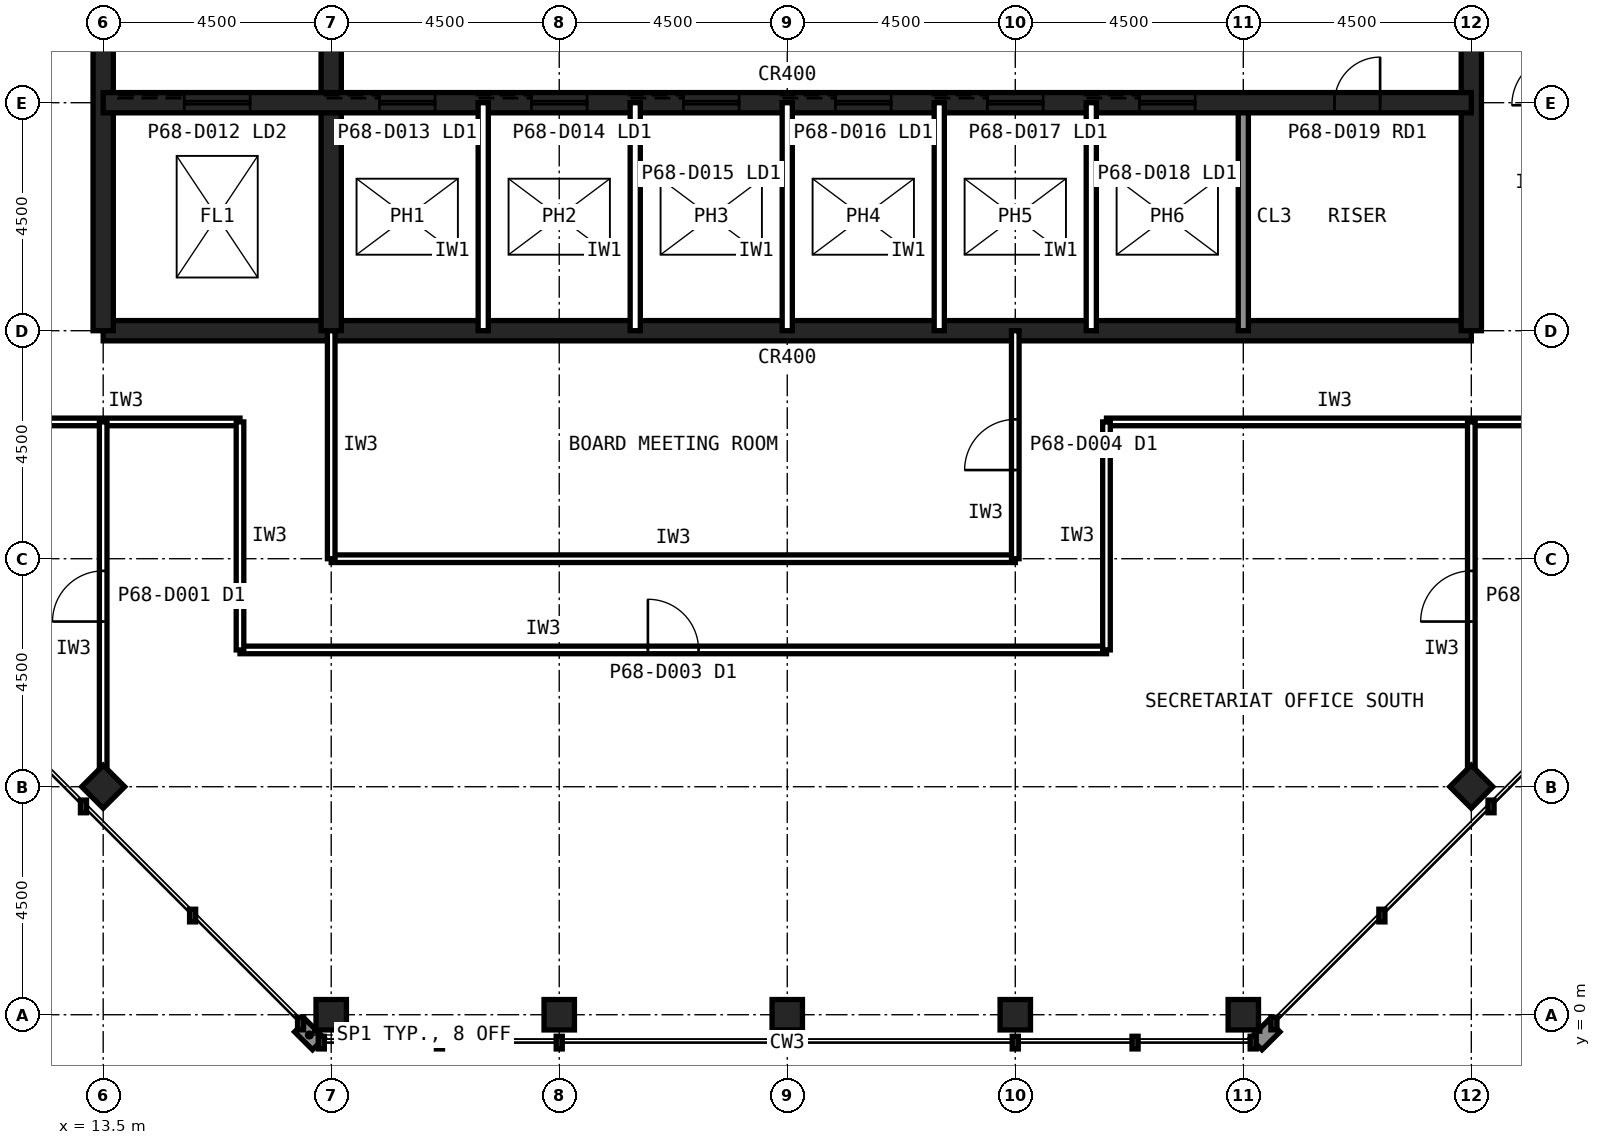
"""IFC4 building model, lengths in metres.
Left out: names, types, materials, properties, quantities, classifications, styles, units other than length and angle.
Written with IfcOpenShell. Run it as: python <this file> out.ifc"""

import sys

from ifc_helpers import new_model, si_unit, direction, frame, frame_2d, origin, origin_2d, place, context, subcontext, project, spatial, rectangle, hollow_rectangle, extrude, element, fill, save


model = new_model("IFC4")
c1 = context("Model", 3, precision=1e-05, world=origin(), true_north=direction((0.0, 1.0)))
c2 = subcontext(c1, "Body", "Model", "MODEL_VIEW")
j1 = project(units=[si_unit("LENGTHUNIT", "METRE"), si_unit("PLANEANGLEUNIT", "RADIAN")], contexts=[c1])
p1 = place(None, origin())
s1 = spatial("IfcSite", under=j1, at=p1, CompositionType="ELEMENT")
p2 = place(p1, origin())
s2 = spatial("IfcBuilding", under=s1, at=p2, CompositionType="ELEMENT")
p3 = place(p2, frame((0.0, 0.0, 286.6)))
s3 = spatial("IfcBuildingStorey", under=s2, at=p3, CompositionType="ELEMENT", Elevation=286.6)
for number, where, z_axis, x_axis in (
    (1, (18.0, 0.0, 0.0), (0.0, 0.0, 1.0), (1.0, 0.0, 0.0)),
    (2, (22.5, 0.0, 0.0), (0.0, 0.0, 1.0), (1.0, 0.0, 0.0)),
    (3, (27.0, 0.0, 0.0), (0.0, 0.0, 1.0), (1.0, 0.0, 0.0)),
    (4, (31.5, 0.0, 0.0), (0.0, 0.0, 1.0), (1.0, 0.0, 0.0)),
    (5, (36.0, 0.0, 0.0), (0.0, 0.0, 1.0), (1.0, 0.0, 0.0)),
    (6, (13.5, 4.5, 0.0), (0.0, 0.0, 1.0), (0.707, 0.707, 0.0)),
    (7, (40.5, 4.5, 0.0), (0.0, 0.0, 1.0), (0.707, 0.707, 0.0)),
):
    element("IfcColumn", number, at=place(p3, frame(where, z_axis=z_axis, x_axis=x_axis)), inside=s3, PredefinedType="COLUMN", context=c2, shape_type="SweptSolid", body=[
        extrude(hollow_rectangle(XDim=0.6, YDim=0.6, WallThickness=0.028, at=origin_2d()), origin(), (0.0, 0.0, 1.0), 4.0),
    ])
p4 = place(p3, frame((13.5, 13.5, 0.0), z_axis=(0.0, 0.0, 1.0), x_axis=(1.0, 0.0, 0.0)))
e8 = element("IfcWall", 8, at=p4, inside=s3, PredefinedType="SHEAR", context=c2, shape_type="SweptSolid", body=[
    extrude(rectangle(XDim=27.0, YDim=0.4, at=frame_2d((13.5, 0.0))), origin(), (0.0, 0.0, 1.0), 4.0),
])
p5 = place(p3, frame((40.5, 13.5, 0.0), z_axis=(0.0, 0.0, 1.0), x_axis=(0.0, 1.0, 0.0)))
e9 = element("IfcWall", 9, at=p5, inside=s3, PredefinedType="SHEAR", context=c2, shape_type="SweptSolid", body=[
    extrude(rectangle(XDim=27.0, YDim=0.4, at=frame_2d((13.5, 0.0))), origin(), (0.0, 0.0, 1.0), 4.0),
])
p6 = place(p5, frame((5.85, 0.0, 0.0)))
e10 = element("IfcOpeningElement", 10, at=p6, cuts=e9, PredefinedType="OPENING", context=c2, shape_type="SweptSolid", body=[
    extrude(rectangle(XDim=1.8, YDim=2.1, at=frame_2d((0.9, 1.05))), frame((0.0, 0.21, 0.0), z_axis=(0.0, -1.0, 0.0), x_axis=(1.0, 0.0, 0.0)), (0.0, 0.0, 1.0), 0.42),
])
p7 = place(p5, frame((19.65, 0.0, 0.0)))
e11 = element("IfcOpeningElement", 11, at=p7, cuts=e9, PredefinedType="OPENING", context=c2, shape_type="SweptSolid", body=[
    extrude(rectangle(XDim=1.2, YDim=2.1, at=frame_2d((0.6, 1.05))), frame((0.0, 0.21, 0.0), z_axis=(0.0, -1.0, 0.0), x_axis=(1.0, 0.0, 0.0)), (0.0, 0.0, 1.0), 0.42),
])
p8 = place(p3, frame((13.5, 40.5, 0.0), z_axis=(0.0, 0.0, 1.0), x_axis=(0.0, -1.0, 0.0)))
e12 = element("IfcWall", 12, at=p8, inside=s3, PredefinedType="SHEAR", context=c2, shape_type="SweptSolid", body=[
    extrude(rectangle(XDim=27.0, YDim=0.4, at=frame_2d((13.5, 0.0))), origin(), (0.0, 0.0, 1.0), 4.0),
])
p9 = place(p8, frame((19.65, 0.0, 0.0)))
e13 = element("IfcOpeningElement", 13, at=p9, cuts=e12, PredefinedType="OPENING", context=c2, shape_type="SweptSolid", body=[
    extrude(rectangle(XDim=1.2, YDim=2.1, at=frame_2d((0.6, 1.05))), frame((0.0, 0.21, 0.0), z_axis=(0.0, -1.0, 0.0), x_axis=(1.0, 0.0, 0.0)), (0.0, 0.0, 1.0), 0.42),
])
p10 = place(p8, frame((5.85, 0.0, 0.0)))
e14 = element("IfcOpeningElement", 14, at=p10, cuts=e12, PredefinedType="OPENING", context=c2, shape_type="SweptSolid", body=[
    extrude(rectangle(XDim=1.8, YDim=2.1, at=frame_2d((0.9, 1.05))), frame((0.0, 0.21, 0.0), z_axis=(0.0, -1.0, 0.0), x_axis=(1.0, 0.0, 0.0)), (0.0, 0.0, 1.0), 0.42),
])
p11 = place(p3, frame((18.0, 13.5, 0.0), z_axis=(0.0, 0.0, 1.0), x_axis=(0.0, 1.0, 0.0)))
e15 = element("IfcWall", 15, at=p11, inside=s3, PredefinedType="SHEAR", context=c2, shape_type="SweptSolid", body=[
    extrude(rectangle(XDim=18.0, YDim=0.4, at=frame_2d((9.0, 0.0))), origin(), (0.0, 0.0, 1.0), 4.0),
])
p12 = place(p3, frame((36.0, 13.5, 0.0), z_axis=(0.0, 0.0, 1.0), x_axis=(0.0, 1.0, 0.0)))
e16 = element("IfcWall", 16, at=p12, inside=s3, PredefinedType="SOLIDWALL", context=c2, shape_type="SweptSolid", body=[
    extrude(rectangle(XDim=4.5, YDim=0.2, at=frame_2d((2.25, 0.0))), origin(), (0.0, 0.0, 1.0), 3.84),
])
p13 = place(p3, frame((13.5, 18.0, 0.0), z_axis=(0.0, 0.0, 1.0), x_axis=(1.0, 0.0, 0.0)))
e17 = element("IfcWall", 17, at=p13, inside=s3, PredefinedType="SHEAR", context=c2, shape_type="SweptSolid", body=[
    extrude(rectangle(XDim=27.0, YDim=0.4, at=frame_2d((13.5, 0.0))), origin(), (0.0, 0.0, 1.0), 4.0),
])
p14 = place(p13, frame((24.3, 0.0, 0.0)))
e18 = element("IfcOpeningElement", 18, at=p14, cuts=e17, PredefinedType="OPENING", context=c2, shape_type="SweptSolid", body=[
    extrude(rectangle(XDim=0.9, YDim=2.1, at=frame_2d((0.45, 1.05))), frame((0.0, 0.21, 0.0), z_axis=(0.0, -1.0, 0.0), x_axis=(1.0, 0.0, 0.0)), (0.0, 0.0, 1.0), 0.42),
])
p15 = place(p13, frame((5.45, 0.0, 0.0)))
e19 = element("IfcOpeningElement", 19, at=p15, cuts=e17, PredefinedType="OPENING", context=c2, shape_type="SweptSolid", body=[
    extrude(rectangle(XDim=1.1, YDim=2.1, at=frame_2d((0.55, 1.05))), frame((0.0, 0.21, 0.0), z_axis=(0.0, -1.0, 0.0), x_axis=(1.0, 0.0, 0.0)), (0.0, 0.0, 1.0), 0.42),
])
p16 = place(p13, frame((8.45, 0.0, 0.0)))
e20 = element("IfcOpeningElement", 20, at=p16, cuts=e17, PredefinedType="OPENING", context=c2, shape_type="SweptSolid", body=[
    extrude(rectangle(XDim=1.1, YDim=2.1, at=frame_2d((0.55, 1.05))), frame((0.0, 0.21, 0.0), z_axis=(0.0, -1.0, 0.0), x_axis=(1.0, 0.0, 0.0)), (0.0, 0.0, 1.0), 0.42),
])
p17 = place(p13, frame((11.45, 0.0, 0.0)))
e21 = element("IfcOpeningElement", 21, at=p17, cuts=e17, PredefinedType="OPENING", context=c2, shape_type="SweptSolid", body=[
    extrude(rectangle(XDim=1.1, YDim=2.1, at=frame_2d((0.55, 1.05))), frame((0.0, 0.21, 0.0), z_axis=(0.0, -1.0, 0.0), x_axis=(1.0, 0.0, 0.0)), (0.0, 0.0, 1.0), 0.42),
])
p18 = place(p13, frame((14.45, 0.0, 0.0)))
e22 = element("IfcOpeningElement", 22, at=p18, cuts=e17, PredefinedType="OPENING", context=c2, shape_type="SweptSolid", body=[
    extrude(rectangle(XDim=1.1, YDim=2.1, at=frame_2d((0.55, 1.05))), frame((0.0, 0.21, 0.0), z_axis=(0.0, -1.0, 0.0), x_axis=(1.0, 0.0, 0.0)), (0.0, 0.0, 1.0), 0.42),
])
p19 = place(p13, frame((17.45, 0.0, 0.0)))
e23 = element("IfcOpeningElement", 23, at=p19, cuts=e17, PredefinedType="OPENING", context=c2, shape_type="SweptSolid", body=[
    extrude(rectangle(XDim=1.1, YDim=2.1, at=frame_2d((0.55, 1.05))), frame((0.0, 0.21, 0.0), z_axis=(0.0, -1.0, 0.0), x_axis=(1.0, 0.0, 0.0)), (0.0, 0.0, 1.0), 0.42),
])
p20 = place(p13, frame((20.45, 0.0, 0.0)))
e24 = element("IfcOpeningElement", 24, at=p20, cuts=e17, PredefinedType="OPENING", context=c2, shape_type="SweptSolid", body=[
    extrude(rectangle(XDim=1.1, YDim=2.1, at=frame_2d((0.55, 1.05))), frame((0.0, 0.21, 0.0), z_axis=(0.0, -1.0, 0.0), x_axis=(1.0, 0.0, 0.0)), (0.0, 0.0, 1.0), 0.42),
])
p21 = place(p13, frame((1.6, 0.0, 0.0)))
e25 = element("IfcOpeningElement", 25, at=p21, cuts=e17, PredefinedType="OPENING", context=c2, shape_type="SweptSolid", body=[
    extrude(rectangle(XDim=1.3, YDim=2.2, at=frame_2d((0.65, 1.1))), frame((0.0, 0.21, 0.0), z_axis=(0.0, -1.0, 0.0), x_axis=(1.0, 0.0, 0.0)), (0.0, 0.0, 1.0), 0.42),
])
for number, where, z_axis, x_axis in (
    (26, (21.0, 13.5, 0.0), (0.0, 0.0, 1.0), (0.0, 1.0, 0.0)),
    (27, (24.0, 13.5, 0.0), (0.0, 0.0, 1.0), (0.0, 1.0, 0.0)),
    (28, (27.0, 13.5, 0.0), (0.0, 0.0, 1.0), (0.0, 1.0, 0.0)),
    (29, (30.0, 13.5, 0.0), (0.0, 0.0, 1.0), (0.0, 1.0, 0.0)),
    (30, (33.0, 13.5, 0.0), (0.0, 0.0, 1.0), (0.0, 1.0, 0.0)),
):
    element("IfcWall", number, at=place(p3, frame(where, z_axis=z_axis, x_axis=x_axis)), inside=s3, PredefinedType="PARTITIONING", context=c2, shape_type="SweptSolid", body=[
        extrude(rectangle(XDim=4.5, YDim=0.2, at=frame_2d((2.25, 0.0))), origin(), (0.0, 0.0, 1.0), 3.84),
    ])
p22 = place(p3, frame((16.2, 7.2, 0.0), z_axis=(0.0, 0.0, 1.0), x_axis=(1.0, 0.0, 0.0)))
e31 = element("IfcWall", 31, at=p22, inside=s3, PredefinedType="PARTITIONING", context=c2, shape_type="SweptSolid", body=[
    extrude(rectangle(XDim=17.1, YDim=0.15, at=frame_2d((8.55, 0.0))), origin(), (0.0, 0.0, 1.0), 3.84),
])
p23 = place(p22, frame((8.05, 0.0, 0.0)))
e32 = element("IfcOpeningElement", 32, at=p23, cuts=e31, PredefinedType="OPENING", context=c2, shape_type="SweptSolid", body=[
    extrude(rectangle(XDim=1.0, YDim=2.1, at=frame_2d((0.5, 1.05))), frame((0.0, 0.085, 0.0), z_axis=(0.0, -1.0, 0.0), x_axis=(1.0, 0.0, 0.0)), (0.0, 0.0, 1.0), 0.17),
])
p24 = place(p3, frame((33.3, 11.7, 0.0), z_axis=(0.0, 0.0, 1.0), x_axis=(1.0, 0.0, 0.0)))
e33 = element("IfcWall", 33, at=p24, inside=s3, PredefinedType="PARTITIONING", context=c2, shape_type="SweptSolid", body=[
    extrude(rectangle(XDim=9.0, YDim=0.15, at=frame_2d((4.5, 0.0))), origin(), (0.0, 0.0, 1.0), 3.84),
])
for number, where, z_axis, x_axis in (
    (34, (11.7, 11.7, 0.0), (0.0, 0.0, 1.0), (1.0, 0.0, 0.0)),
    (35, (16.2, 11.7, 0.0), (0.0, 0.0, 1.0), (0.0, -1.0, 0.0)),
    (36, (33.3, 7.2, 0.0), (0.0, 0.0, 1.0), (0.0, 1.0, 0.0)),
):
    element("IfcWall", number, at=place(p3, frame(where, z_axis=z_axis, x_axis=x_axis)), inside=s3, PredefinedType="PARTITIONING", context=c2, shape_type="SweptSolid", body=[
        extrude(rectangle(XDim=4.5, YDim=0.15, at=frame_2d((2.25, 0.0))), origin(), (0.0, 0.0, 1.0), 3.84),
    ])
p25 = place(p3, frame((18.0, 9.0, 0.0), z_axis=(0.0, 0.0, 1.0), x_axis=(1.0, 0.0, 0.0)))
e37 = element("IfcWall", 37, at=p25, inside=s3, PredefinedType="PARTITIONING", context=c2, shape_type="SweptSolid", body=[
    extrude(rectangle(XDim=13.5, YDim=0.15, at=frame_2d((6.75, 0.0))), origin(), (0.0, 0.0, 1.0), 3.84),
])
p26 = place(p3, frame((31.5, 9.0, 0.0), z_axis=(0.0, 0.0, 1.0), x_axis=(0.0, 1.0, 0.0)))
e38 = element("IfcWall", 38, at=p26, inside=s3, PredefinedType="PARTITIONING", context=c2, shape_type="SweptSolid", body=[
    extrude(rectangle(XDim=4.5, YDim=0.15, at=frame_2d((2.25, 0.0))), origin(), (0.0, 0.0, 1.0), 2.989),
])
p27 = place(p26, frame((1.75, 0.0, 0.0)))
e39 = element("IfcOpeningElement", 39, at=p27, cuts=e38, PredefinedType="OPENING", context=c2, shape_type="SweptSolid", body=[
    extrude(rectangle(XDim=1.0, YDim=2.1, at=frame_2d((0.5, 1.05))), frame((0.0, 0.085, 0.0), z_axis=(0.0, -1.0, 0.0), x_axis=(1.0, 0.0, 0.0)), (0.0, 0.0, 1.0), 0.17),
])
p28 = place(p3, frame((18.0, 13.5, 0.0), z_axis=(0.0, 0.0, 1.0), x_axis=(0.0, -1.0, 0.0)))
e40 = element("IfcWall", 40, at=p28, inside=s3, PredefinedType="PARTITIONING", context=c2, shape_type="SweptSolid", body=[
    extrude(rectangle(XDim=4.5, YDim=0.15, at=frame_2d((2.25, 0.0))), origin(), (0.0, 0.0, 1.0), 2.989),
])
p29 = place(p3, frame((40.5, 4.82, 0.0), z_axis=(0.0, 0.0, 1.0), x_axis=(0.0, 1.0, 0.0)))
e41 = element("IfcWall", 41, at=p29, inside=s3, PredefinedType="PARTITIONING", context=c2, shape_type="SweptSolid", body=[
    extrude(rectangle(XDim=6.88, YDim=0.15, at=frame_2d((3.44, 0.0))), origin(), (0.0, 0.0, 1.0), 2.989),
])
p30 = place(p29, frame((2.94, 0.0, 0.0)))
e42 = element("IfcOpeningElement", 42, at=p30, cuts=e41, PredefinedType="OPENING", context=c2, shape_type="SweptSolid", body=[
    extrude(rectangle(XDim=1.0, YDim=2.1, at=frame_2d((0.5, 1.05))), frame((0.0, 0.085, 0.0), z_axis=(0.0, -1.0, 0.0), x_axis=(1.0, 0.0, 0.0)), (0.0, 0.0, 1.0), 0.17),
])
p31 = place(p3, frame((13.5, 4.82, 0.0), z_axis=(0.0, 0.0, 1.0), x_axis=(0.0, 1.0, 0.0)))
e43 = element("IfcWall", 43, at=p31, inside=s3, PredefinedType="PARTITIONING", context=c2, shape_type="SweptSolid", body=[
    extrude(rectangle(XDim=6.88, YDim=0.15, at=frame_2d((3.44, 0.0))), origin(), (0.0, 0.0, 1.0), 2.989),
])
p32 = place(p31, frame((2.94, 0.0, 0.0)))
e44 = element("IfcOpeningElement", 44, at=p32, cuts=e43, PredefinedType="OPENING", context=c2, shape_type="SweptSolid", body=[
    extrude(rectangle(XDim=1.0, YDim=2.1, at=frame_2d((0.5, 1.05))), frame((0.0, 0.085, 0.0), z_axis=(0.0, -1.0, 0.0), x_axis=(1.0, 0.0, 0.0)), (0.0, 0.0, 1.0), 0.17),
])
p33 = place(p14, origin())
e45 = element("IfcDoor", 45, at=p33, inside=s3, OperationType="SINGLE_SWING_RIGHT", PredefinedType="DOOR", context=c2, shape_type="SweptSolid", body=[
    extrude(rectangle(XDim=0.9, YDim=2.1, at=frame_2d((0.45, 1.05))), frame((0.0, 0.025, 0.0), z_axis=(0.0, -1.0, 0.0), x_axis=(1.0, 0.0, 0.0)), (0.0, 0.0, 1.0), 0.05),
])
fill(e18, e45)
p34 = place(p15, origin())
e46 = element("IfcDoor", 46, at=p34, inside=s3, OperationType="SLIDING_TO_LEFT", PredefinedType="DOOR", context=c2, shape_type="SweptSolid", body=[
    extrude(rectangle(XDim=1.1, YDim=2.1, at=frame_2d((0.55, 1.05))), frame((0.0, 0.025, 0.0), z_axis=(0.0, -1.0, 0.0), x_axis=(1.0, 0.0, 0.0)), (0.0, 0.0, 1.0), 0.05),
])
fill(e19, e46)
p35 = place(p16, origin())
e47 = element("IfcDoor", 47, at=p35, inside=s3, OperationType="SLIDING_TO_LEFT", PredefinedType="DOOR", context=c2, shape_type="SweptSolid", body=[
    extrude(rectangle(XDim=1.1, YDim=2.1, at=frame_2d((0.55, 1.05))), frame((0.0, 0.025, 0.0), z_axis=(0.0, -1.0, 0.0), x_axis=(1.0, 0.0, 0.0)), (0.0, 0.0, 1.0), 0.05),
])
fill(e20, e47)
p36 = place(p17, origin())
e48 = element("IfcDoor", 48, at=p36, inside=s3, OperationType="SLIDING_TO_LEFT", PredefinedType="DOOR", context=c2, shape_type="SweptSolid", body=[
    extrude(rectangle(XDim=1.1, YDim=2.1, at=frame_2d((0.55, 1.05))), frame((0.0, 0.025, 0.0), z_axis=(0.0, -1.0, 0.0), x_axis=(1.0, 0.0, 0.0)), (0.0, 0.0, 1.0), 0.05),
])
fill(e21, e48)
p37 = place(p18, origin())
e49 = element("IfcDoor", 49, at=p37, inside=s3, OperationType="SLIDING_TO_LEFT", PredefinedType="DOOR", context=c2, shape_type="SweptSolid", body=[
    extrude(rectangle(XDim=1.1, YDim=2.1, at=frame_2d((0.55, 1.05))), frame((0.0, 0.025, 0.0), z_axis=(0.0, -1.0, 0.0), x_axis=(1.0, 0.0, 0.0)), (0.0, 0.0, 1.0), 0.05),
])
fill(e22, e49)
p38 = place(p19, origin())
e50 = element("IfcDoor", 50, at=p38, inside=s3, OperationType="SLIDING_TO_LEFT", PredefinedType="DOOR", context=c2, shape_type="SweptSolid", body=[
    extrude(rectangle(XDim=1.1, YDim=2.1, at=frame_2d((0.55, 1.05))), frame((0.0, 0.025, 0.0), z_axis=(0.0, -1.0, 0.0), x_axis=(1.0, 0.0, 0.0)), (0.0, 0.0, 1.0), 0.05),
])
fill(e23, e50)
p39 = place(p20, origin())
e51 = element("IfcDoor", 51, at=p39, inside=s3, OperationType="SLIDING_TO_LEFT", PredefinedType="DOOR", context=c2, shape_type="SweptSolid", body=[
    extrude(rectangle(XDim=1.1, YDim=2.1, at=frame_2d((0.55, 1.05))), frame((0.0, 0.025, 0.0), z_axis=(0.0, -1.0, 0.0), x_axis=(1.0, 0.0, 0.0)), (0.0, 0.0, 1.0), 0.05),
])
fill(e24, e51)
p40 = place(p21, origin())
e52 = element("IfcDoor", 52, at=p40, inside=s3, OperationType="SLIDING_TO_LEFT", PredefinedType="DOOR", context=c2, shape_type="SweptSolid", body=[
    extrude(rectangle(XDim=1.3, YDim=2.2, at=frame_2d((0.65, 1.1))), frame((0.0, 0.025, 0.0), z_axis=(0.0, -1.0, 0.0), x_axis=(1.0, 0.0, 0.0)), (0.0, 0.0, 1.0), 0.05),
])
fill(e25, e52)
p41 = place(p23, origin())
e53 = element("IfcDoor", 53, at=p41, inside=s3, OperationType="SINGLE_SWING_LEFT", PredefinedType="DOOR", context=c2, shape_type="SweptSolid", body=[
    extrude(rectangle(XDim=1.0, YDim=2.1, at=frame_2d((0.5, 1.05))), frame((0.0, 0.025, 0.0), z_axis=(0.0, -1.0, 0.0), x_axis=(1.0, 0.0, 0.0)), (0.0, 0.0, 1.0), 0.05),
])
fill(e32, e53)
p42 = place(p27, origin())
e54 = element("IfcDoor", 54, at=p42, inside=s3, OperationType="SINGLE_SWING_LEFT", PredefinedType="DOOR", context=c2, shape_type="SweptSolid", body=[
    extrude(rectangle(XDim=1.0, YDim=2.1, at=frame_2d((0.5, 1.05))), frame((0.0, 0.025, 0.0), z_axis=(0.0, -1.0, 0.0), x_axis=(1.0, 0.0, 0.0)), (0.0, 0.0, 1.0), 0.05),
])
fill(e39, e54)
p43 = place(p30, origin())
e55 = element("IfcDoor", 55, at=p43, inside=s3, OperationType="SINGLE_SWING_LEFT", PredefinedType="DOOR", context=c2, shape_type="SweptSolid", body=[
    extrude(rectangle(XDim=1.0, YDim=2.1, at=frame_2d((0.5, 1.05))), frame((0.0, 0.025, 0.0), z_axis=(0.0, -1.0, 0.0), x_axis=(1.0, 0.0, 0.0)), (0.0, 0.0, 1.0), 0.05),
])
fill(e42, e55)
p44 = place(p32, origin())
e56 = element("IfcDoor", 56, at=p44, inside=s3, OperationType="SINGLE_SWING_LEFT", PredefinedType="DOOR", context=c2, shape_type="SweptSolid", body=[
    extrude(rectangle(XDim=1.0, YDim=2.1, at=frame_2d((0.5, 1.05))), frame((0.0, 0.025, 0.0), z_axis=(0.0, -1.0, 0.0), x_axis=(1.0, 0.0, 0.0)), (0.0, 0.0, 1.0), 0.05),
])
fill(e44, e56)
save(model, sys.argv[1])
